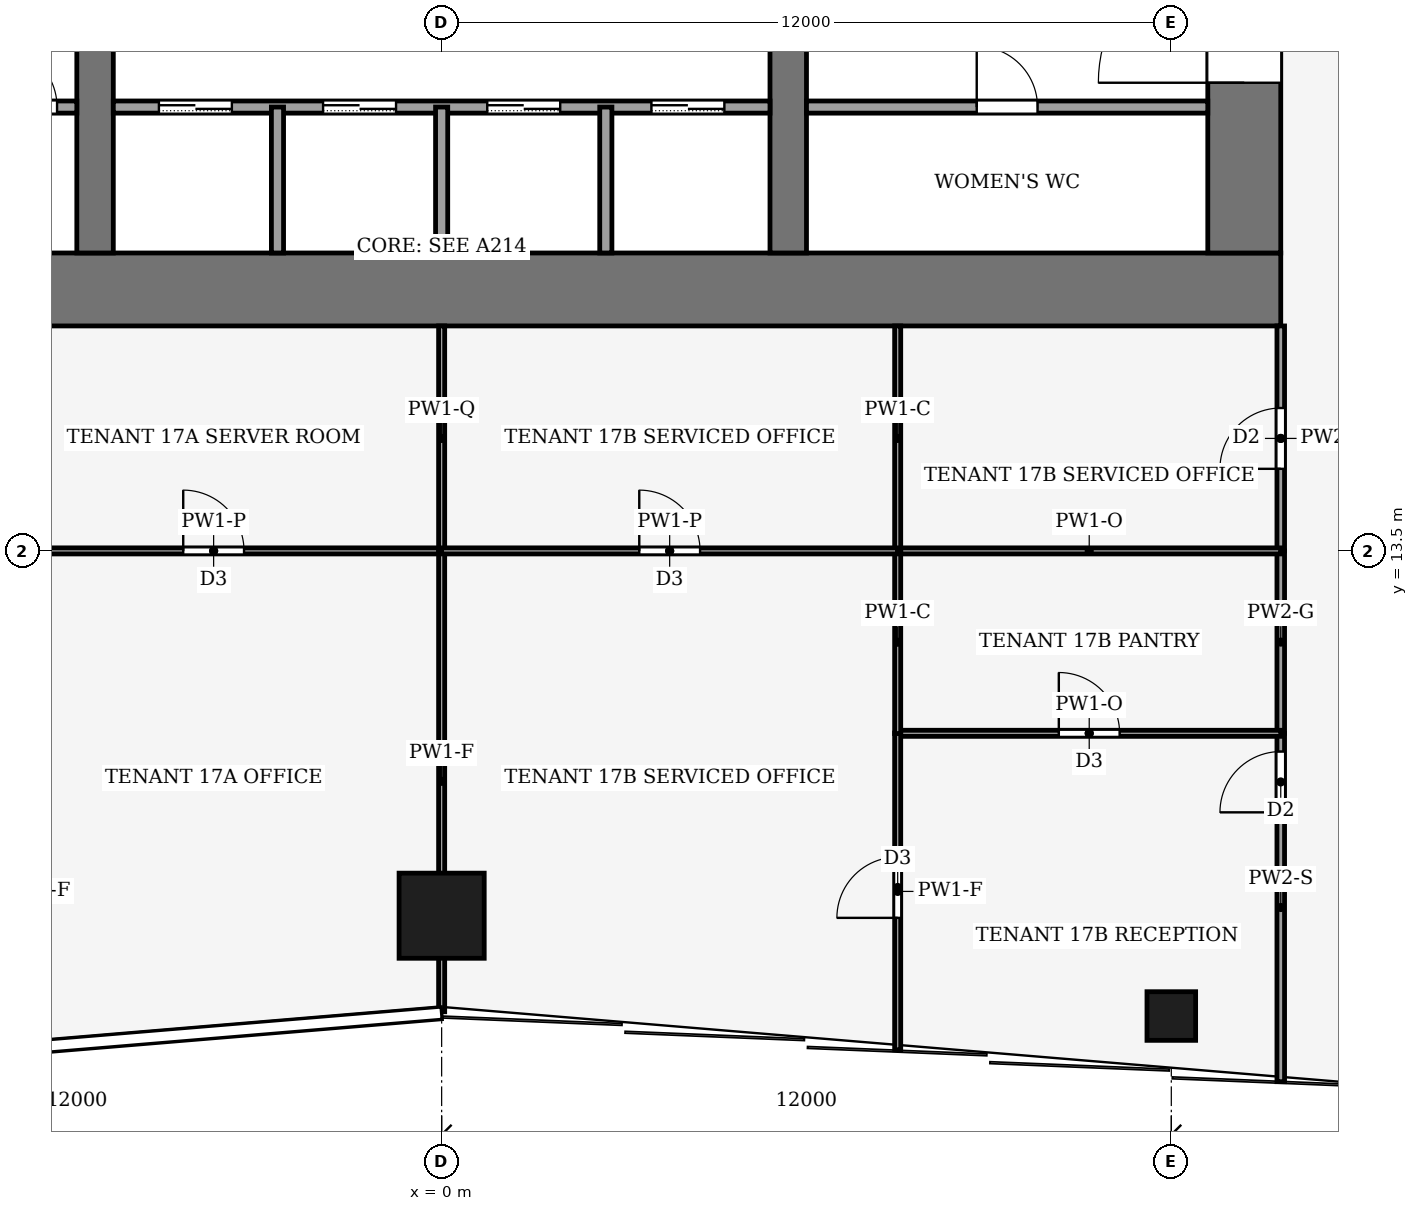
"""IFC4 building model, lengths in metres.
Left out: names, types, materials, properties, quantities, classifications, styles, units other than length and angle.
Written with IfcOpenShell. Run it as: python <this file> out.ifc"""

import sys

from ifc_helpers import new_model, si_unit, direction, frame, frame_2d, origin, origin_2d, place, context, subcontext, project, spatial, rectangle, hollow_rectangle, extrude, element, fill, save


model = new_model("IFC4")
c1 = context("Model", 3, precision=1e-05, world=origin(), true_north=direction((0.0, 1.0)))
c2 = subcontext(c1, "Body", "Model", "MODEL_VIEW")
j1 = project(units=[si_unit("LENGTHUNIT", "METRE"), si_unit("PLANEANGLEUNIT", "RADIAN")], contexts=[c1])
p1 = place(None, origin())
s1 = spatial("IfcSite", under=j1, at=p1, CompositionType="ELEMENT")
p2 = place(p1, origin())
s2 = spatial("IfcBuilding", under=s1, at=p2, CompositionType="ELEMENT")
p3 = place(p2, frame((0.0, 0.0, 78.0)))
s3 = spatial("IfcBuildingStorey", under=s2, at=p3, CompositionType="ELEMENT", Elevation=78.0)
p4 = place(p3, frame((-13.8, 17.8, -0.13), z_axis=(0.0, 0.0, 1.0), x_axis=(1.0, 0.0, 0.0)))
e1 = element("IfcWall", 1, at=p4, inside=s3, PredefinedType="SHEAR", context=c2, shape_type="SweptSolid", body=[
    extrude(rectangle(XDim=27.6, YDim=1.2, at=frame_2d((13.8, 0.0))), origin(), (0.0, 0.0, 1.0), 4.0),
])
p5 = place(p3, frame((13.2, 18.4, -0.13), z_axis=(0.0, 0.0, 1.0), x_axis=(0.0, 1.0, 0.0)))
e2 = element("IfcWall", 2, at=p5, inside=s3, PredefinedType="SHEAR", context=c2, shape_type="SweptSolid", body=[
    extrude(rectangle(XDim=19.2, YDim=1.2, at=frame_2d((9.6, 0.0))), origin(), (0.0, 0.0, 1.0), 4.0),
])
p6 = place(p5, frame((2.8, 0.0, 0.13)))
e3 = element("IfcOpeningElement", 3, at=p6, cuts=e2, PredefinedType="OPENING", context=c2, shape_type="SweptSolid", body=[
    extrude(rectangle(XDim=2.4, YDim=2.4, at=frame_2d((1.2, 1.2))), frame((0.0, 0.61, 0.0), z_axis=(0.0, -1.0, 0.0), x_axis=(1.0, 0.0, 0.0)), (0.0, 0.0, 1.0), 1.22),
])
p7 = place(p5, frame((13.3, 0.0, 0.13)))
e4 = element("IfcOpeningElement", 4, at=p7, cuts=e2, PredefinedType="OPENING", context=c2, shape_type="SweptSolid", body=[
    extrude(rectangle(XDim=2.4, YDim=2.4, at=frame_2d((1.2, 1.2))), frame((0.0, 0.61, 0.0), z_axis=(0.0, -1.0, 0.0), x_axis=(1.0, 0.0, 0.0)), (0.0, 0.0, 1.0), 1.22),
])
p8 = place(p3, frame((-5.7, 18.4, -0.13), z_axis=(0.0, 0.0, 1.0), x_axis=(0.0, 1.0, 0.0)))
e5 = element("IfcWall", 5, at=p8, inside=s3, PredefinedType="SHEAR", context=c2, shape_type="SweptSolid", body=[
    extrude(rectangle(XDim=19.2, YDim=0.6, at=frame_2d((9.6, 0.0))), origin(), (0.0, 0.0, 1.0), 4.0),
])
p9 = place(p8, frame((8.35, 0.0, 0.13)))
e6 = element("IfcOpeningElement", 6, at=p9, cuts=e5, PredefinedType="OPENING", context=c2, shape_type="SweptSolid", body=[
    extrude(rectangle(XDim=0.9, YDim=2.1, at=frame_2d((0.45, 1.05))), frame((0.0, 0.31, 0.0), z_axis=(0.0, -1.0, 0.0), x_axis=(1.0, 0.0, 0.0)), (0.0, 0.0, 1.0), 0.62),
])
p10 = place(p3, frame((5.7, 18.4, -0.13), z_axis=(0.0, 0.0, 1.0), x_axis=(0.0, 1.0, 0.0)))
e7 = element("IfcWall", 7, at=p10, inside=s3, PredefinedType="SHEAR", context=c2, shape_type="SweptSolid", body=[
    extrude(rectangle(XDim=19.2, YDim=0.6, at=frame_2d((9.6, 0.0))), origin(), (0.0, 0.0, 1.0), 4.0),
])
p11 = place(p10, frame((8.35, 0.0, 0.13)))
e8 = element("IfcOpeningElement", 8, at=p11, cuts=e7, PredefinedType="OPENING", context=c2, shape_type="SweptSolid", body=[
    extrude(rectangle(XDim=0.9, YDim=2.1, at=frame_2d((0.45, 1.05))), frame((0.0, 0.31, 0.0), z_axis=(0.0, -1.0, 0.0), x_axis=(1.0, 0.0, 0.0)), (0.0, 0.0, 1.0), 0.62),
])
p12 = place(p10, frame((13.3, 0.0, 0.13)))
e9 = element("IfcOpeningElement", 9, at=p12, cuts=e7, PredefinedType="OPENING", context=c2, shape_type="SweptSolid", body=[
    extrude(rectangle(XDim=2.4, YDim=2.4, at=frame_2d((1.2, 1.2))), frame((0.0, 0.31, 0.0), z_axis=(0.0, -1.0, 0.0), x_axis=(1.0, 0.0, 0.0)), (0.0, 0.0, 1.0), 0.62),
])
p13 = place(p3, frame((0.0, 7.5, 0.0), z_axis=(0.0, 0.0, 1.0), x_axis=(1.0, 0.0, 0.0)))
e10 = element("IfcColumn", 10, at=p13, inside=s3, PredefinedType="COLUMN", context=c2, shape_type="SweptSolid", body=[
    extrude(hollow_rectangle(XDim=1.4, YDim=1.4, WallThickness=0.08, at=origin_2d()), origin(), (0.0, 0.0, 1.0), 4.0),
])
p14 = place(p3, frame((12.0, 5.85, 0.0), z_axis=(0.0, 0.0, 1.0), x_axis=(1.0, 0.0, 0.0)))
e11 = element("IfcColumn", 11, at=p14, inside=s3, PredefinedType="COLUMN", context=c2, shape_type="SweptSolid", body=[
    extrude(hollow_rectangle(XDim=0.8, YDim=0.8, WallThickness=0.04, at=origin_2d()), origin(), (0.0, 0.0, 1.0), 4.0),
])
p15 = place(p3, frame((-12.6, 20.8, 0.0), z_axis=(0.0, 0.0, 1.0), x_axis=(1.0, 0.0, 0.0)))
e12 = element("IfcWall", 12, at=p15, inside=s3, PredefinedType="PARTITIONING", context=c2, shape_type="SweptSolid", body=[
    extrude(rectangle(XDim=6.6, YDim=0.2, at=frame_2d((3.3, 0.0))), origin(), (0.0, 0.0, 1.0), 3.87),
])
p16 = place(p15, frame((0.325, 0.0, 0.0)))
e13 = element("IfcOpeningElement", 13, at=p16, cuts=e12, PredefinedType="OPENING", context=c2, shape_type="SweptSolid", body=[
    extrude(rectangle(XDim=1.0, YDim=2.1, at=frame_2d((0.5, 1.05))), frame((0.0, 0.11, 0.0), z_axis=(0.0, -1.0, 0.0), x_axis=(1.0, 0.0, 0.0)), (0.0, 0.0, 1.0), 0.22),
])
p17 = place(p15, frame((1.975, 0.0, 0.0)))
e14 = element("IfcOpeningElement", 14, at=p17, cuts=e12, PredefinedType="OPENING", context=c2, shape_type="SweptSolid", body=[
    extrude(rectangle(XDim=1.0, YDim=2.1, at=frame_2d((0.5, 1.05))), frame((0.0, 0.11, 0.0), z_axis=(0.0, -1.0, 0.0), x_axis=(1.0, 0.0, 0.0)), (0.0, 0.0, 1.0), 0.22),
])
p18 = place(p15, frame((3.625, 0.0, 0.0)))
e15 = element("IfcOpeningElement", 15, at=p18, cuts=e12, PredefinedType="OPENING", context=c2, shape_type="SweptSolid", body=[
    extrude(rectangle(XDim=1.0, YDim=2.1, at=frame_2d((0.5, 1.05))), frame((0.0, 0.11, 0.0), z_axis=(0.0, -1.0, 0.0), x_axis=(1.0, 0.0, 0.0)), (0.0, 0.0, 1.0), 0.22),
])
p19 = place(p15, frame((5.275, 0.0, 0.0)))
e16 = element("IfcOpeningElement", 16, at=p19, cuts=e12, PredefinedType="OPENING", context=c2, shape_type="SweptSolid", body=[
    extrude(rectangle(XDim=1.0, YDim=2.1, at=frame_2d((0.5, 1.05))), frame((0.0, 0.11, 0.0), z_axis=(0.0, -1.0, 0.0), x_axis=(1.0, 0.0, 0.0)), (0.0, 0.0, 1.0), 0.22),
])
p20 = place(p3, frame((-5.4, 20.8, 0.0), z_axis=(0.0, 0.0, 1.0), x_axis=(1.0, 0.0, 0.0)))
e17 = element("IfcWall", 17, at=p20, inside=s3, PredefinedType="PARTITIONING", context=c2, shape_type="SweptSolid", body=[
    extrude(rectangle(XDim=10.8, YDim=0.2, at=frame_2d((5.4, 0.0))), origin(), (0.0, 0.0, 1.0), 3.87),
])
p21 = place(p20, frame((0.75, 0.0, 0.0)))
e18 = element("IfcOpeningElement", 18, at=p21, cuts=e17, PredefinedType="OPENING", context=c2, shape_type="SweptSolid", body=[
    extrude(rectangle(XDim=1.2, YDim=2.2, at=frame_2d((0.6, 1.1))), frame((0.0, 0.11, 0.0), z_axis=(0.0, -1.0, 0.0), x_axis=(1.0, 0.0, 0.0)), (0.0, 0.0, 1.0), 0.22),
])
p22 = place(p20, frame((3.45, 0.0, 0.0)))
e19 = element("IfcOpeningElement", 19, at=p22, cuts=e17, PredefinedType="OPENING", context=c2, shape_type="SweptSolid", body=[
    extrude(rectangle(XDim=1.2, YDim=2.2, at=frame_2d((0.6, 1.1))), frame((0.0, 0.11, 0.0), z_axis=(0.0, -1.0, 0.0), x_axis=(1.0, 0.0, 0.0)), (0.0, 0.0, 1.0), 0.22),
])
p23 = place(p20, frame((6.15, 0.0, 0.0)))
e20 = element("IfcOpeningElement", 20, at=p23, cuts=e17, PredefinedType="OPENING", context=c2, shape_type="SweptSolid", body=[
    extrude(rectangle(XDim=1.2, YDim=2.2, at=frame_2d((0.6, 1.1))), frame((0.0, 0.11, 0.0), z_axis=(0.0, -1.0, 0.0), x_axis=(1.0, 0.0, 0.0)), (0.0, 0.0, 1.0), 0.22),
])
p24 = place(p20, frame((8.85, 0.0, 0.0)))
e21 = element("IfcOpeningElement", 21, at=p24, cuts=e17, PredefinedType="OPENING", context=c2, shape_type="SweptSolid", body=[
    extrude(rectangle(XDim=1.2, YDim=2.2, at=frame_2d((0.6, 1.1))), frame((0.0, 0.11, 0.0), z_axis=(0.0, -1.0, 0.0), x_axis=(1.0, 0.0, 0.0)), (0.0, 0.0, 1.0), 0.22),
])
p25 = place(p3, frame((6.0, 20.8, 0.0), z_axis=(0.0, 0.0, 1.0), x_axis=(1.0, 0.0, 0.0)))
e22 = element("IfcWall", 22, at=p25, inside=s3, PredefinedType="PARTITIONING", context=c2, shape_type="SweptSolid", body=[
    extrude(rectangle(XDim=6.6, YDim=0.2, at=frame_2d((3.3, 0.0))), origin(), (0.0, 0.0, 1.0), 3.87),
])
p26 = place(p25, frame((2.8, 0.0, 0.0)))
e23 = element("IfcOpeningElement", 23, at=p26, cuts=e22, PredefinedType="OPENING", context=c2, shape_type="SweptSolid", body=[
    extrude(rectangle(XDim=1.0, YDim=2.1, at=frame_2d((0.5, 1.05))), frame((0.0, 0.11, 0.0), z_axis=(0.0, -1.0, 0.0), x_axis=(1.0, 0.0, 0.0)), (0.0, 0.0, 1.0), 0.22),
])
for number, where, z_axis, x_axis in (
    (24, (-2.7, 18.4, 0.0), (0.0, 0.0, 1.0), (0.0, 1.0, 0.0)),
    (25, (0.0, 18.4, 0.0), (0.0, 0.0, 1.0), (0.0, 1.0, 0.0)),
    (26, (2.7, 18.4, 0.0), (0.0, 0.0, 1.0), (0.0, 1.0, 0.0)),
):
    element("IfcWall", number, at=place(p3, frame(where, z_axis=z_axis, x_axis=x_axis)), inside=s3, PredefinedType="PARTITIONING", context=c2, shape_type="SweptSolid", body=[
        extrude(rectangle(XDim=2.4, YDim=0.2, at=frame_2d((1.2, 0.0))), origin(), (0.0, 0.0, 1.0), 3.87),
    ])
p27 = place(p3, frame((13.8, 4.77, 0.0), z_axis=(0.0, 0.0, 1.0), x_axis=(0.0, 1.0, 0.0)))
e27 = element("IfcWall", 27, at=p27, inside=s3, PredefinedType="PARTITIONING", context=c2, shape_type="SweptSolid", body=[
    extrude(rectangle(XDim=5.73, YDim=0.125, at=frame_2d((2.865, 0.0))), origin(), (0.0, 0.0, 1.0), 3.04),
])
p28 = place(p27, frame((4.43, 0.0, 0.0)))
e28 = element("IfcOpeningElement", 28, at=p28, cuts=e27, PredefinedType="OPENING", context=c2, shape_type="SweptSolid", body=[
    extrude(rectangle(XDim=1.0, YDim=2.1, at=frame_2d((0.5, 1.05))), frame((0.0, 0.073, 0.0), z_axis=(0.0, -1.0, 0.0), x_axis=(1.0, 0.0, 0.0)), (0.0, 0.0, 1.0), 0.145),
])
p29 = place(p3, frame((13.8, 13.5, 0.0), z_axis=(0.0, 0.0, 1.0), x_axis=(0.0, -1.0, 0.0)))
e29 = element("IfcWall", 29, at=p29, inside=s3, PredefinedType="PARTITIONING", context=c2, shape_type="SweptSolid", body=[
    extrude(rectangle(XDim=3.0, YDim=0.125, at=frame_2d((1.5, 0.0))), origin(), (0.0, 0.0, 1.0), 3.87),
])
p30 = place(p3, frame((13.8, 13.5, 0.0), z_axis=(0.0, 0.0, 1.0), x_axis=(0.0, 1.0, 0.0)))
e30 = element("IfcWall", 30, at=p30, inside=s3, PredefinedType="PARTITIONING", context=c2, shape_type="SweptSolid", body=[
    extrude(rectangle(XDim=3.7, YDim=0.125, at=frame_2d((1.85, 0.0))), origin(), (0.0, 0.0, 1.0), 3.14),
])
p31 = place(p30, frame((1.35, 0.0, 0.0)))
e31 = element("IfcOpeningElement", 31, at=p31, cuts=e30, PredefinedType="OPENING", context=c2, shape_type="SweptSolid", body=[
    extrude(rectangle(XDim=1.0, YDim=2.1, at=frame_2d((0.5, 1.05))), frame((0.0, 0.073, 0.0), z_axis=(0.0, -1.0, 0.0), x_axis=(1.0, 0.0, 0.0)), (0.0, 0.0, 1.0), 0.145),
])
p32 = place(p3, frame((-7.5, 13.5, 0.0), z_axis=(0.0, 0.0, 1.0), x_axis=(1.0, 0.0, 0.0)))
e32 = element("IfcWall", 32, at=p32, inside=s3, PredefinedType="PARTITIONING", context=c2, shape_type="SweptSolid", body=[
    extrude(rectangle(XDim=7.5, YDim=0.1, at=frame_2d((3.75, 0.0))), origin(), (0.0, 0.0, 1.0), 3.44),
])
p33 = place(p32, frame((3.25, 0.0, 0.0)))
e33 = element("IfcOpeningElement", 33, at=p33, cuts=e32, PredefinedType="OPENING", context=c2, shape_type="SweptSolid", body=[
    extrude(rectangle(XDim=1.0, YDim=2.1, at=frame_2d((0.5, 1.05))), frame((0.0, 0.06, 0.0), z_axis=(0.0, -1.0, 0.0), x_axis=(1.0, 0.0, 0.0)), (0.0, 0.0, 1.0), 0.12),
])
p34 = place(p3, frame((0.0, 5.92, 0.0), z_axis=(0.0, 0.0, 1.0), x_axis=(0.0, 1.0, 0.0)))
e34 = element("IfcWall", 34, at=p34, inside=s3, PredefinedType="PARTITIONING", context=c2, shape_type="SweptSolid", body=[
    extrude(rectangle(XDim=7.58, YDim=0.1, at=frame_2d((3.79, 0.0))), origin(), (0.0, 0.0, 1.0), 3.04),
])
p35 = place(p3, frame((0.0, 13.5, 0.0), z_axis=(0.0, 0.0, 1.0), x_axis=(0.0, 1.0, 0.0)))
e35 = element("IfcWall", 35, at=p35, inside=s3, PredefinedType="PARTITIONING", context=c2, shape_type="SweptSolid", body=[
    extrude(rectangle(XDim=3.7, YDim=0.1, at=frame_2d((1.85, 0.0))), origin(), (0.0, 0.0, 1.0), 3.48),
])
p36 = place(p3, frame((7.5, 10.5, 0.0), z_axis=(0.0, 0.0, 1.0), x_axis=(1.0, 0.0, 0.0)))
e36 = element("IfcWall", 36, at=p36, inside=s3, PredefinedType="PARTITIONING", context=c2, shape_type="SweptSolid", body=[
    extrude(rectangle(XDim=6.3, YDim=0.1, at=frame_2d((3.15, 0.0))), origin(), (0.0, 0.0, 1.0), 3.39),
])
p37 = place(p36, frame((2.65, 0.0, 0.0)))
e37 = element("IfcOpeningElement", 37, at=p37, cuts=e36, PredefinedType="OPENING", context=c2, shape_type="SweptSolid", body=[
    extrude(rectangle(XDim=1.0, YDim=2.1, at=frame_2d((0.5, 1.05))), frame((0.0, 0.06, 0.0), z_axis=(0.0, -1.0, 0.0), x_axis=(1.0, 0.0, 0.0)), (0.0, 0.0, 1.0), 0.12),
])
p38 = place(p3, frame((7.5, 5.295, 0.0), z_axis=(0.0, 0.0, 1.0), x_axis=(0.0, 1.0, 0.0)))
e38 = element("IfcWall", 38, at=p38, inside=s3, PredefinedType="PARTITIONING", context=c2, shape_type="SweptSolid", body=[
    extrude(rectangle(XDim=5.209, YDim=0.1, at=frame_2d((2.604, 0.0))), origin(), (0.0, 0.0, 1.0), 3.04),
])
p39 = place(p38, frame((2.17, 0.0, 0.0)))
e39 = element("IfcOpeningElement", 39, at=p39, cuts=e38, PredefinedType="OPENING", context=c2, shape_type="SweptSolid", body=[
    extrude(rectangle(XDim=1.0, YDim=2.1, at=frame_2d((0.5, 1.05))), frame((0.0, 0.06, 0.0), z_axis=(0.0, -1.0, 0.0), x_axis=(1.0, 0.0, 0.0)), (0.0, 0.0, 1.0), 0.12),
])
p40 = place(p3, frame((13.8, 13.5, 0.0), z_axis=(0.0, 0.0, 1.0), x_axis=(-1.0, 0.0, 0.0)))
e40 = element("IfcWall", 40, at=p40, inside=s3, PredefinedType="PARTITIONING", context=c2, shape_type="SweptSolid", body=[
    extrude(rectangle(XDim=6.3, YDim=0.1, at=frame_2d((3.15, 0.0))), origin(), (0.0, 0.0, 1.0), 3.39),
])
p41 = place(p3, frame((7.5, 13.5, 0.0), z_axis=(0.0, 0.0, 1.0), x_axis=(0.0, -1.0, 0.0)))
e41 = element("IfcWall", 41, at=p41, inside=s3, PredefinedType="PARTITIONING", context=c2, shape_type="SweptSolid", body=[
    extrude(rectangle(XDim=3.004, YDim=0.1, at=frame_2d((1.502, 0.0))), origin(), (0.0, 0.0, 1.0), 3.87),
])
p42 = place(p3, frame((7.5, 17.2, 0.0), z_axis=(0.0, 0.0, 1.0), x_axis=(0.0, -1.0, 0.0)))
e42 = element("IfcWall", 42, at=p42, inside=s3, PredefinedType="PARTITIONING", context=c2, shape_type="SweptSolid", body=[
    extrude(rectangle(XDim=3.7, YDim=0.1, at=frame_2d((1.85, 0.0))), origin(), (0.0, 0.0, 1.0), 3.87),
])
p43 = place(p3, frame((0.0, 13.5, 0.0), z_axis=(0.0, 0.0, 1.0), x_axis=(1.0, 0.0, 0.0)))
e43 = element("IfcWall", 43, at=p43, inside=s3, PredefinedType="PARTITIONING", context=c2, shape_type="SweptSolid", body=[
    extrude(rectangle(XDim=7.5, YDim=0.1, at=frame_2d((3.75, 0.0))), origin(), (0.0, 0.0, 1.0), 3.44),
])
p44 = place(p43, frame((3.25, 0.0, 0.0)))
e44 = element("IfcOpeningElement", 44, at=p44, cuts=e43, PredefinedType="OPENING", context=c2, shape_type="SweptSolid", body=[
    extrude(rectangle(XDim=1.0, YDim=2.1, at=frame_2d((0.5, 1.05))), frame((0.0, 0.06, 0.0), z_axis=(0.0, -1.0, 0.0), x_axis=(1.0, 0.0, 0.0)), (0.0, 0.0, 1.0), 0.12),
])
p45 = place(p21, origin())
e45 = element("IfcDoor", 45, at=p45, inside=s3, OperationType="SLIDING_TO_LEFT", PredefinedType="DOOR", context=c2, shape_type="SweptSolid", body=[
    extrude(rectangle(XDim=1.2, YDim=2.2, at=frame_2d((0.6, 1.1))), frame((0.0, 0.025, 0.0), z_axis=(0.0, -1.0, 0.0), x_axis=(1.0, 0.0, 0.0)), (0.0, 0.0, 1.0), 0.05),
])
fill(e18, e45)
p46 = place(p22, origin())
e46 = element("IfcDoor", 46, at=p46, inside=s3, OperationType="SLIDING_TO_LEFT", PredefinedType="DOOR", context=c2, shape_type="SweptSolid", body=[
    extrude(rectangle(XDim=1.2, YDim=2.2, at=frame_2d((0.6, 1.1))), frame((0.0, 0.025, 0.0), z_axis=(0.0, -1.0, 0.0), x_axis=(1.0, 0.0, 0.0)), (0.0, 0.0, 1.0), 0.05),
])
fill(e19, e46)
p47 = place(p23, origin())
e47 = element("IfcDoor", 47, at=p47, inside=s3, OperationType="SLIDING_TO_LEFT", PredefinedType="DOOR", context=c2, shape_type="SweptSolid", body=[
    extrude(rectangle(XDim=1.2, YDim=2.2, at=frame_2d((0.6, 1.1))), frame((0.0, 0.025, 0.0), z_axis=(0.0, -1.0, 0.0), x_axis=(1.0, 0.0, 0.0)), (0.0, 0.0, 1.0), 0.05),
])
fill(e20, e47)
p48 = place(p24, origin())
e48 = element("IfcDoor", 48, at=p48, inside=s3, OperationType="SLIDING_TO_LEFT", PredefinedType="DOOR", context=c2, shape_type="SweptSolid", body=[
    extrude(rectangle(XDim=1.2, YDim=2.2, at=frame_2d((0.6, 1.1))), frame((0.0, 0.025, 0.0), z_axis=(0.0, -1.0, 0.0), x_axis=(1.0, 0.0, 0.0)), (0.0, 0.0, 1.0), 0.05),
])
fill(e21, e48)
p49 = place(p19, origin())
e49 = element("IfcDoor", 49, at=p49, inside=s3, OperationType="SINGLE_SWING_LEFT", PredefinedType="DOOR", context=c2, shape_type="SweptSolid", body=[
    extrude(rectangle(XDim=1.0, YDim=2.1, at=frame_2d((0.5, 1.05))), frame((0.0, 0.025, 0.0), z_axis=(0.0, -1.0, 0.0), x_axis=(1.0, 0.0, 0.0)), (0.0, 0.0, 1.0), 0.05),
])
fill(e16, e49)
p50 = place(p26, origin())
e50 = element("IfcDoor", 50, at=p50, inside=s3, OperationType="SINGLE_SWING_LEFT", PredefinedType="DOOR", context=c2, shape_type="SweptSolid", body=[
    extrude(rectangle(XDim=1.0, YDim=2.1, at=frame_2d((0.5, 1.05))), frame((0.0, 0.025, 0.0), z_axis=(0.0, -1.0, 0.0), x_axis=(1.0, 0.0, 0.0)), (0.0, 0.0, 1.0), 0.05),
])
fill(e23, e50)
p51 = place(p6, origin())
e51 = element("IfcDoor", 51, at=p51, inside=s3, OperationType="DOUBLE_DOOR_SINGLE_SWING", PredefinedType="DOOR", context=c2, shape_type="SweptSolid", body=[
    extrude(rectangle(XDim=2.4, YDim=2.4, at=frame_2d((1.2, 1.2))), frame((0.0, 0.025, 0.0), z_axis=(0.0, -1.0, 0.0), x_axis=(1.0, 0.0, 0.0)), (0.0, 0.0, 1.0), 0.05),
])
fill(e3, e51)
p52 = place(p28, origin())
e52 = element("IfcDoor", 52, at=p52, inside=s3, OperationType="SINGLE_SWING_RIGHT", PredefinedType="DOOR", context=c2, shape_type="SweptSolid", body=[
    extrude(rectangle(XDim=1.0, YDim=2.1, at=frame_2d((0.5, 1.05))), frame((0.0, 0.025, 0.0), z_axis=(0.0, -1.0, 0.0), x_axis=(1.0, 0.0, 0.0)), (0.0, 0.0, 1.0), 0.05),
])
fill(e28, e52)
p53 = place(p31, origin())
e53 = element("IfcDoor", 53, at=p53, inside=s3, OperationType="SINGLE_SWING_RIGHT", PredefinedType="DOOR", context=c2, shape_type="SweptSolid", body=[
    extrude(rectangle(XDim=1.0, YDim=2.1, at=frame_2d((0.5, 1.05))), frame((0.0, 0.025, 0.0), z_axis=(0.0, -1.0, 0.0), x_axis=(1.0, 0.0, 0.0)), (0.0, 0.0, 1.0), 0.05),
])
fill(e31, e53)
p54 = place(p33, origin())
e54 = element("IfcDoor", 54, at=p54, inside=s3, OperationType="SINGLE_SWING_RIGHT", PredefinedType="DOOR", context=c2, shape_type="SweptSolid", body=[
    extrude(rectangle(XDim=1.0, YDim=2.1, at=frame_2d((0.5, 1.05))), frame((0.0, 0.025, 0.0), z_axis=(0.0, -1.0, 0.0), x_axis=(1.0, 0.0, 0.0)), (0.0, 0.0, 1.0), 0.05),
])
fill(e33, e54)
p55 = place(p37, origin())
e55 = element("IfcDoor", 55, at=p55, inside=s3, OperationType="SINGLE_SWING_LEFT", PredefinedType="DOOR", context=c2, shape_type="SweptSolid", body=[
    extrude(rectangle(XDim=1.0, YDim=2.1, at=frame_2d((0.5, 1.05))), frame((0.0, 0.025, 0.0), z_axis=(0.0, -1.0, 0.0), x_axis=(1.0, 0.0, 0.0)), (0.0, 0.0, 1.0), 0.05),
])
fill(e37, e55)
p56 = place(p39, origin())
e56 = element("IfcDoor", 56, at=p56, inside=s3, OperationType="SINGLE_SWING_RIGHT", PredefinedType="DOOR", context=c2, shape_type="SweptSolid", body=[
    extrude(rectangle(XDim=1.0, YDim=2.1, at=frame_2d((0.5, 1.05))), frame((0.0, 0.025, 0.0), z_axis=(0.0, -1.0, 0.0), x_axis=(1.0, 0.0, 0.0)), (0.0, 0.0, 1.0), 0.05),
])
fill(e39, e56)
p57 = place(p44, origin())
e57 = element("IfcDoor", 57, at=p57, inside=s3, OperationType="SINGLE_SWING_LEFT", PredefinedType="DOOR", context=c2, shape_type="SweptSolid", body=[
    extrude(rectangle(XDim=1.0, YDim=2.1, at=frame_2d((0.5, 1.05))), frame((0.0, 0.025, 0.0), z_axis=(0.0, -1.0, 0.0), x_axis=(1.0, 0.0, 0.0)), (0.0, 0.0, 1.0), 0.05),
])
fill(e44, e57)
save(model, sys.argv[1])
